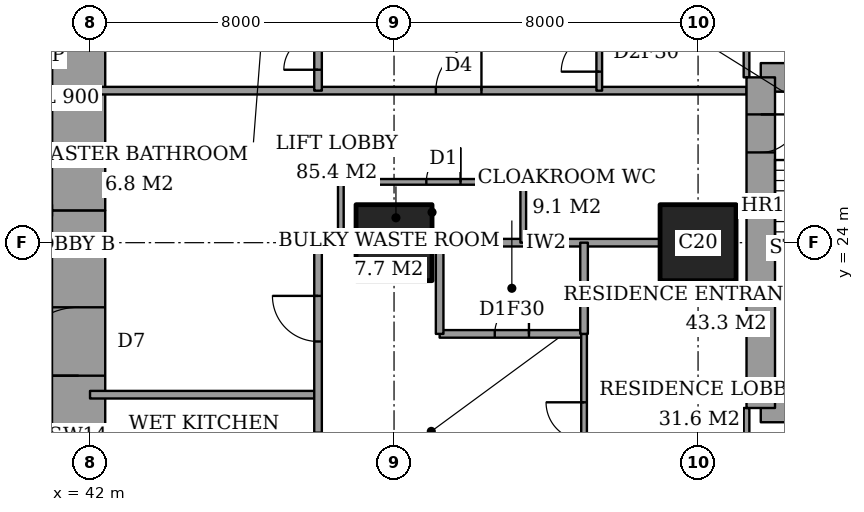
"""IFC4 building model, lengths in metres.
Left out: names, types, materials, properties, quantities, classifications, styles, units other than length and angle.
Written with IfcOpenShell. Run it as: python <this file> out.ifc"""

import sys

from ifc_helpers import new_model, si_unit, direction, frame, frame_2d, origin, origin_2d, place, context, subcontext, project, spatial, rectangle, extrude, element, fill, save


model = new_model("IFC4")
c1 = context("Model", 3, precision=1e-05, world=origin(), true_north=direction((0.0, 1.0)))
c2 = subcontext(c1, "Body", "Model", "MODEL_VIEW")
j1 = project(units=[si_unit("LENGTHUNIT", "METRE"), si_unit("PLANEANGLEUNIT", "RADIAN")], contexts=[c1])
p1 = place(None, origin())
s1 = spatial("IfcSite", under=j1, at=p1, CompositionType="ELEMENT")
p2 = place(p1, origin())
s2 = spatial("IfcBuilding", under=s1, at=p2, CompositionType="ELEMENT")
p3 = place(p2, frame((0.0, 0.0, 62.0)))
s3 = spatial("IfcBuildingStorey", under=s2, at=p3, CompositionType="ELEMENT", Elevation=62.0)
for number, where, z_axis, x_axis in (
    (1, (50.0, 24.0, 0.0), (0.0, 0.0, 1.0), (1.0, 0.0, 0.0)),
    (2, (58.0, 24.0, 0.0), (0.0, 0.0, 1.0), (1.0, 0.0, 0.0)),
):
    element("IfcColumn", number, at=place(p3, frame(where, z_axis=z_axis, x_axis=x_axis)), inside=s3, PredefinedType="COLUMN", context=c2, shape_type="SweptSolid", body=[
        extrude(rectangle(XDim=2.0, YDim=2.0, at=origin_2d()), origin(), (0.0, 0.0, 1.0), 3.6),
    ])
p4 = place(p3, frame((41.7, 13.0, 0.0), z_axis=(0.0, 0.0, 1.0), x_axis=(0.0, 1.0, 0.0)))
e3 = element("IfcWall", 3, at=p4, inside=s3, PredefinedType="SHEAR", context=c2, shape_type="SweptSolid", body=[
    extrude(rectangle(XDim=11.85, YDim=1.4, at=frame_2d((5.925, 0.0))), origin(), (0.0, 0.0, 1.0), 3.6),
])
p5 = place(p4, frame((7.5, 0.0, 0.0)))
e4 = element("IfcOpeningElement", 4, at=p5, cuts=e3, PredefinedType="OPENING", context=c2, shape_type="SweptSolid", body=[
    extrude(rectangle(XDim=1.8, YDim=2.4, at=frame_2d((0.9, 1.2))), frame((0.0, 0.71, 0.0), z_axis=(0.0, -1.0, 0.0), x_axis=(1.0, 0.0, 0.0)), (0.0, 0.0, 1.0), 1.42),
])
p6 = place(p3, frame((41.7, 24.85, 0.0), z_axis=(0.0, 0.0, 1.0), x_axis=(0.0, 1.0, 0.0)))
e5 = element("IfcWall", 5, at=p6, inside=s3, PredefinedType="SHEAR", context=c2, shape_type="SweptSolid", body=[
    extrude(rectangle(XDim=10.15, YDim=1.4, at=frame_2d((5.075, 0.0))), origin(), (0.0, 0.0, 1.0), 3.6),
])
for number, where, z_axis, x_axis in (
    (6, (59.65, 19.65, 0.0), (0.0, 0.0, 1.0), (1.0, 0.0, 0.0)),
    (7, (64.1, 28.35, 0.0), (0.0, 0.0, 1.0), (-1.0, 0.0, 0.0)),
):
    element("IfcWall", number, at=place(p3, frame(where, z_axis=z_axis, x_axis=x_axis)), inside=s3, PredefinedType="SHEAR", context=c2, shape_type="SweptSolid", body=[
        extrude(rectangle(XDim=4.45, YDim=0.75, at=frame_2d((2.225, 0.0))), origin(), (0.0, 0.0, 1.0), 3.6),
    ])
p7 = place(p3, frame((59.65, 28.35, 0.0), z_axis=(0.0, 0.0, 1.0), x_axis=(0.0, -1.0, 0.0)))
e8 = element("IfcWall", 8, at=p7, inside=s3, PredefinedType="SHEAR", context=c2, shape_type="SweptSolid", body=[
    extrude(rectangle(XDim=8.7, YDim=0.75, at=frame_2d((4.35, 0.0))), origin(), (0.0, 0.0, 1.0), 3.6),
])
p8 = place(p7, frame((0.975, 0.0, 0.0)))
e9 = element("IfcOpeningElement", 9, at=p8, cuts=e8, PredefinedType="OPENING", context=c2, shape_type="SweptSolid", body=[
    extrude(rectangle(XDim=1.0, YDim=2.1, at=frame_2d((0.5, 1.05))), frame((0.0, 0.385, 0.0), z_axis=(0.0, -1.0, 0.0), x_axis=(1.0, 0.0, 0.0)), (0.0, 0.0, 1.0), 0.77),
])
p9 = place(p3, frame((42.0, 20.0, 0.0), z_axis=(0.0, 0.0, 1.0), x_axis=(1.0, 0.0, 0.0)))
e10 = element("IfcWall", 10, at=p9, inside=s3, PredefinedType="PARTITIONING", context=c2, shape_type="SweptSolid", body=[
    extrude(rectangle(XDim=6.0, YDim=0.2, at=frame_2d((3.0, 0.0))), origin(), (0.0, 0.0, 1.0), 3.35),
])
p10 = place(p3, frame((51.2, 21.6, 0.0), z_axis=(0.0, 0.0, 1.0), x_axis=(1.0, 0.0, 0.0)))
e11 = element("IfcWall", 11, at=p10, inside=s3, PredefinedType="PARTITIONING", context=c2, shape_type="SweptSolid", body=[
    extrude(rectangle(XDim=3.8, YDim=0.2, at=frame_2d((1.9, 0.0))), origin(), (0.0, 0.0, 1.0), 3.35),
])
p11 = place(p10, frame((1.45, 0.0, 0.0)))
e12 = element("IfcOpeningElement", 12, at=p11, cuts=e11, PredefinedType="OPENING", context=c2, shape_type="SweptSolid", body=[
    extrude(rectangle(XDim=0.9, YDim=2.1, at=frame_2d((0.45, 1.05))), frame((0.0, 0.11, 0.0), z_axis=(0.0, -1.0, 0.0), x_axis=(1.0, 0.0, 0.0)), (0.0, 0.0, 1.0), 0.22),
])
p12 = place(p3, frame((48.0, 24.0, 0.0), z_axis=(0.0, 0.0, 1.0), x_axis=(1.0, 0.0, 0.0)))
e13 = element("IfcWall", 13, at=p12, inside=s3, PredefinedType="PARTITIONING", context=c2, shape_type="SweptSolid", body=[
    extrude(rectangle(XDim=1.0, YDim=0.2, at=frame_2d((0.5, 0.0))), origin(), (0.0, 0.0, 1.0), 3.35),
])
p13 = place(p3, frame((51.0, 24.0, 0.0), z_axis=(0.0, 0.0, 1.0), x_axis=(1.0, 0.0, 0.0)))
e14 = element("IfcWall", 14, at=p13, inside=s3, PredefinedType="PARTITIONING", context=c2, shape_type="SweptSolid", body=[
    extrude(rectangle(XDim=6.0, YDim=0.2, at=frame_2d((3.0, 0.0))), origin(), (0.0, 0.0, 1.0), 3.35),
])
p14 = place(p3, frame((48.6, 25.6, 0.0), z_axis=(0.0, 0.0, 1.0), x_axis=(1.0, 0.0, 0.0)))
e15 = element("IfcWall", 15, at=p14, inside=s3, PredefinedType="PARTITIONING", context=c2, shape_type="SweptSolid", body=[
    extrude(rectangle(XDim=4.8, YDim=0.15, at=frame_2d((2.4, 0.0))), origin(), (0.0, 0.0, 1.0), 3.35),
])
p15 = place(p14, frame((2.25, 0.0, 0.0)))
e16 = element("IfcOpeningElement", 16, at=p15, cuts=e15, PredefinedType="OPENING", context=c2, shape_type="SweptSolid", body=[
    extrude(rectangle(XDim=0.9, YDim=2.1, at=frame_2d((0.45, 1.05))), frame((0.0, 0.085, 0.0), z_axis=(0.0, -1.0, 0.0), x_axis=(1.0, 0.0, 0.0)), (0.0, 0.0, 1.0), 0.17),
])
p16 = place(p3, frame((42.0, 28.0, 0.0), z_axis=(0.0, 0.0, 1.0), x_axis=(1.0, 0.0, 0.0)))
e17 = element("IfcWall", 17, at=p16, inside=s3, PredefinedType="PARTITIONING", context=c2, shape_type="SweptSolid", body=[
    extrude(rectangle(XDim=17.275, YDim=0.2, at=frame_2d((8.637, 0.0))), origin(), (0.0, 0.0, 1.0), 3.35),
])
p17 = place(p16, frame((9.1, 0.0, 0.0)))
e18 = element("IfcOpeningElement", 18, at=p17, cuts=e17, PredefinedType="OPENING", context=c2, shape_type="SweptSolid", body=[
    extrude(rectangle(XDim=1.2, YDim=2.4, at=frame_2d((0.6, 1.2))), frame((0.0, 0.11, 0.0), z_axis=(0.0, -1.0, 0.0), x_axis=(1.0, 0.0, 0.0)), (0.0, 0.0, 1.0), 0.22),
])
p18 = place(p3, frame((48.0, 17.0, 0.0), z_axis=(0.0, 0.0, 1.0), x_axis=(0.0, 1.0, 0.0)))
e19 = element("IfcWall", 19, at=p18, inside=s3, PredefinedType="PARTITIONING", context=c2, shape_type="SweptSolid", body=[
    extrude(rectangle(XDim=7.0, YDim=0.2, at=frame_2d((3.5, 0.0))), origin(), (0.0, 0.0, 1.0), 3.35),
])
p19 = place(p18, frame((4.4, 0.0, 0.0)))
e20 = element("IfcOpeningElement", 20, at=p19, cuts=e19, PredefinedType="OPENING", context=c2, shape_type="SweptSolid", body=[
    extrude(rectangle(XDim=1.2, YDim=2.4, at=frame_2d((0.6, 1.2))), frame((0.0, 0.11, 0.0), z_axis=(0.0, -1.0, 0.0), x_axis=(1.0, 0.0, 0.0)), (0.0, 0.0, 1.0), 0.22),
])
p20 = place(p18, frame((1.0, 0.0, 0.0)))
e21 = element("IfcOpeningElement", 21, at=p20, cuts=e19, PredefinedType="OPENING", context=c2, shape_type="SweptSolid", body=[
    extrude(rectangle(XDim=1.0, YDim=2.1, at=frame_2d((0.5, 1.05))), frame((0.0, 0.11, 0.0), z_axis=(0.0, -1.0, 0.0), x_axis=(1.0, 0.0, 0.0)), (0.0, 0.0, 1.0), 0.22),
])
p21 = place(p3, frame((48.0, 28.0, 0.0), z_axis=(0.0, 0.0, 1.0), x_axis=(0.0, 1.0, 0.0)))
e22 = element("IfcWall", 22, at=p21, inside=s3, PredefinedType="PARTITIONING", context=c2, shape_type="SweptSolid", body=[
    extrude(rectangle(XDim=2.5, YDim=0.2, at=frame_2d((1.25, 0.0))), origin(), (0.0, 0.0, 1.0), 3.35),
])
p22 = place(p21, frame((0.55, 0.0, 0.0)))
e23 = element("IfcOpeningElement", 23, at=p22, cuts=e22, PredefinedType="OPENING", context=c2, shape_type="SweptSolid", body=[
    extrude(rectangle(XDim=0.9, YDim=2.1, at=frame_2d((0.45, 1.05))), frame((0.0, 0.11, 0.0), z_axis=(0.0, -1.0, 0.0), x_axis=(1.0, 0.0, 0.0)), (0.0, 0.0, 1.0), 0.22),
])
p23 = place(p3, frame((48.6, 24.0, 0.0), z_axis=(0.0, 0.0, 1.0), x_axis=(0.0, 1.0, 0.0)))
e24 = element("IfcWall", 24, at=p23, inside=s3, PredefinedType="PARTITIONING", context=c2, shape_type="SweptSolid", body=[
    extrude(rectangle(XDim=1.6, YDim=0.15, at=frame_2d((0.8, 0.0))), origin(), (0.0, 0.0, 1.0), 3.35),
])
p24 = place(p3, frame((51.2, 21.6, 0.0), z_axis=(0.0, 0.0, 1.0), x_axis=(0.0, 1.0, 0.0)))
e25 = element("IfcWall", 25, at=p24, inside=s3, PredefinedType="PARTITIONING", context=c2, shape_type="SweptSolid", body=[
    extrude(rectangle(XDim=2.4, YDim=0.2, at=frame_2d((1.2, 0.0))), origin(), (0.0, 0.0, 1.0), 3.35),
])
p25 = place(p3, frame((53.4, 24.0, 0.0), z_axis=(0.0, 0.0, 1.0), x_axis=(0.0, 1.0, 0.0)))
e26 = element("IfcWall", 26, at=p25, inside=s3, PredefinedType="PARTITIONING", context=c2, shape_type="SweptSolid", body=[
    extrude(rectangle(XDim=1.6, YDim=0.15, at=frame_2d((0.8, 0.0))), origin(), (0.0, 0.0, 1.0), 3.35),
])
p26 = place(p3, frame((55.0, 21.6, 0.0), z_axis=(0.0, 0.0, 1.0), x_axis=(0.0, 1.0, 0.0)))
e27 = element("IfcWall", 27, at=p26, inside=s3, PredefinedType="PARTITIONING", context=c2, shape_type="SweptSolid", body=[
    extrude(rectangle(XDim=2.4, YDim=0.2, at=frame_2d((1.2, 0.0))), origin(), (0.0, 0.0, 1.0), 3.35),
])
p27 = place(p3, frame((55.0, 10.6, 0.0), z_axis=(0.0, 0.0, 1.0), x_axis=(0.0, 1.0, 0.0)))
e28 = element("IfcWall", 28, at=p27, inside=s3, PredefinedType="PARTITIONING", context=c2, shape_type="SweptSolid", body=[
    extrude(rectangle(XDim=11.0, YDim=0.15, at=frame_2d((5.5, 0.0))), origin(), (0.0, 0.0, 1.0), 3.35),
])
p28 = place(p27, frame((8.2, 0.0, 0.0)))
e29 = element("IfcOpeningElement", 29, at=p28, cuts=e28, PredefinedType="OPENING", context=c2, shape_type="SweptSolid", body=[
    extrude(rectangle(XDim=1.0, YDim=2.1, at=frame_2d((0.5, 1.05))), frame((0.0, 0.085, 0.0), z_axis=(0.0, -1.0, 0.0), x_axis=(1.0, 0.0, 0.0)), (0.0, 0.0, 1.0), 0.17),
])
p29 = place(p3, frame((55.4, 28.0, 0.0), z_axis=(0.0, 0.0, 1.0), x_axis=(0.0, 1.0, 0.0)))
e30 = element("IfcWall", 30, at=p29, inside=s3, PredefinedType="PARTITIONING", context=c2, shape_type="SweptSolid", body=[
    extrude(rectangle(XDim=9.2, YDim=0.15, at=frame_2d((4.6, 0.0))), origin(), (0.0, 0.0, 1.0), 3.35),
])
p30 = place(p29, frame((0.5, 0.0, 0.0)))
e31 = element("IfcOpeningElement", 31, at=p30, cuts=e30, PredefinedType="OPENING", context=c2, shape_type="SweptSolid", body=[
    extrude(rectangle(XDim=1.0, YDim=2.1, at=frame_2d((0.5, 1.05))), frame((0.0, 0.085, 0.0), z_axis=(0.0, -1.0, 0.0), x_axis=(1.0, 0.0, 0.0)), (0.0, 0.0, 1.0), 0.17),
])
p31 = place(p3, frame((59.275, 17.2, 0.0), z_axis=(0.0, 0.0, 1.0), x_axis=(0.0, 1.0, 0.0)))
e32 = element("IfcWall", 32, at=p31, inside=s3, PredefinedType="PARTITIONING", context=c2, shape_type="SweptSolid", body=[
    extrude(rectangle(XDim=2.45, YDim=0.15, at=frame_2d((1.225, 0.0))), origin(), (0.0, 0.0, 1.0), 3.35),
])
p32 = place(p31, frame((0.538, 0.0, 0.0)))
e33 = element("IfcOpeningElement", 33, at=p32, cuts=e32, PredefinedType="OPENING", context=c2, shape_type="SweptSolid", body=[
    extrude(rectangle(XDim=1.0, YDim=2.1, at=frame_2d((0.5, 1.05))), frame((0.0, 0.085, 0.0), z_axis=(0.0, -1.0, 0.0), x_axis=(1.0, 0.0, 0.0)), (0.0, 0.0, 1.0), 0.17),
])
p33 = place(p3, frame((59.275, 28.35, 0.0), z_axis=(0.0, 0.0, 1.0), x_axis=(0.0, 1.0, 0.0)))
e34 = element("IfcWall", 34, at=p33, inside=s3, PredefinedType="PARTITIONING", context=c2, shape_type="SweptSolid", body=[
    extrude(rectangle(XDim=2.45, YDim=0.15, at=frame_2d((1.225, 0.0))), origin(), (0.0, 0.0, 1.0), 3.35),
])
p34 = place(p33, frame((0.962, 0.0, 0.0)))
e35 = element("IfcOpeningElement", 35, at=p34, cuts=e34, PredefinedType="OPENING", context=c2, shape_type="SweptSolid", body=[
    extrude(rectangle(XDim=0.9, YDim=2.1, at=frame_2d((0.45, 1.05))), frame((0.0, 0.085, 0.0), z_axis=(0.0, -1.0, 0.0), x_axis=(1.0, 0.0, 0.0)), (0.0, 0.0, 1.0), 0.17),
])
p35 = place(p28, origin())
e36 = element("IfcDoor", 36, at=p35, inside=s3, OperationType="SINGLE_SWING_LEFT", PredefinedType="DOOR", context=c2, shape_type="SweptSolid", body=[
    extrude(rectangle(XDim=1.0, YDim=2.1, at=frame_2d((0.5, 1.05))), frame((0.0, 0.025, 0.0), z_axis=(0.0, -1.0, 0.0), x_axis=(1.0, 0.0, 0.0)), (0.0, 0.0, 1.0), 0.05),
])
fill(e29, e36)
p36 = place(p11, origin())
e37 = element("IfcDoor", 37, at=p36, inside=s3, OperationType="SINGLE_SWING_LEFT", PredefinedType="DOOR", context=c2, shape_type="SweptSolid", body=[
    extrude(rectangle(XDim=0.9, YDim=2.1, at=frame_2d((0.45, 1.05))), frame((0.0, 0.025, 0.0), z_axis=(0.0, -1.0, 0.0), x_axis=(1.0, 0.0, 0.0)), (0.0, 0.0, 1.0), 0.05),
])
fill(e12, e37)
p37 = place(p19, origin())
e38 = element("IfcDoor", 38, at=p37, inside=s3, OperationType="SINGLE_SWING_LEFT", PredefinedType="DOOR", context=c2, shape_type="SweptSolid", body=[
    extrude(rectangle(XDim=1.2, YDim=2.4, at=frame_2d((0.6, 1.2))), frame((0.0, 0.025, 0.0), z_axis=(0.0, -1.0, 0.0), x_axis=(1.0, 0.0, 0.0)), (0.0, 0.0, 1.0), 0.05),
])
fill(e20, e38)
p38 = place(p30, origin())
e39 = element("IfcDoor", 39, at=p38, inside=s3, OperationType="SINGLE_SWING_RIGHT", PredefinedType="DOOR", context=c2, shape_type="SweptSolid", body=[
    extrude(rectangle(XDim=1.0, YDim=2.1, at=frame_2d((0.5, 1.05))), frame((0.0, 0.025, 0.0), z_axis=(0.0, -1.0, 0.0), x_axis=(1.0, 0.0, 0.0)), (0.0, 0.0, 1.0), 0.05),
])
fill(e31, e39)
p39 = place(p17, origin())
e40 = element("IfcDoor", 40, at=p39, inside=s3, OperationType="SINGLE_SWING_LEFT", PredefinedType="DOOR", context=c2, shape_type="SweptSolid", body=[
    extrude(rectangle(XDim=1.2, YDim=2.4, at=frame_2d((0.6, 1.2))), frame((0.0, 0.025, 0.0), z_axis=(0.0, -1.0, 0.0), x_axis=(1.0, 0.0, 0.0)), (0.0, 0.0, 1.0), 0.05),
])
fill(e18, e40)
p40 = place(p22, origin())
e41 = element("IfcDoor", 41, at=p40, inside=s3, OperationType="SINGLE_SWING_RIGHT", PredefinedType="DOOR", context=c2, shape_type="SweptSolid", body=[
    extrude(rectangle(XDim=0.9, YDim=2.1, at=frame_2d((0.45, 1.05))), frame((0.0, 0.025, 0.0), z_axis=(0.0, -1.0, 0.0), x_axis=(1.0, 0.0, 0.0)), (0.0, 0.0, 1.0), 0.05),
])
fill(e23, e41)
p41 = place(p15, origin())
e42 = element("IfcDoor", 42, at=p41, inside=s3, OperationType="SINGLE_SWING_LEFT", PredefinedType="DOOR", context=c2, shape_type="SweptSolid", body=[
    extrude(rectangle(XDim=0.9, YDim=2.1, at=frame_2d((0.45, 1.05))), frame((0.0, 0.025, 0.0), z_axis=(0.0, -1.0, 0.0), x_axis=(1.0, 0.0, 0.0)), (0.0, 0.0, 1.0), 0.05),
])
fill(e16, e42)
p42 = place(p5, origin())
e43 = element("IfcDoor", 43, at=p42, inside=s3, OperationType="DOUBLE_DOOR_DOUBLE_SWING", PredefinedType="DOOR", context=c2, shape_type="SweptSolid", body=[
    extrude(rectangle(XDim=1.8, YDim=2.4, at=frame_2d((0.9, 1.2))), frame((0.0, 0.025, 0.0), z_axis=(0.0, -1.0, 0.0), x_axis=(1.0, 0.0, 0.0)), (0.0, 0.0, 1.0), 0.05),
])
fill(e4, e43)
p43 = place(p8, origin())
e44 = element("IfcDoor", 44, at=p43, inside=s3, OperationType="SINGLE_SWING_RIGHT", PredefinedType="DOOR", context=c2, shape_type="SweptSolid", body=[
    extrude(rectangle(XDim=1.0, YDim=2.1, at=frame_2d((0.5, 1.05))), frame((0.0, 0.025, 0.0), z_axis=(0.0, -1.0, 0.0), x_axis=(1.0, 0.0, 0.0)), (0.0, 0.0, 1.0), 0.05),
])
fill(e9, e44)
save(model, sys.argv[1])
